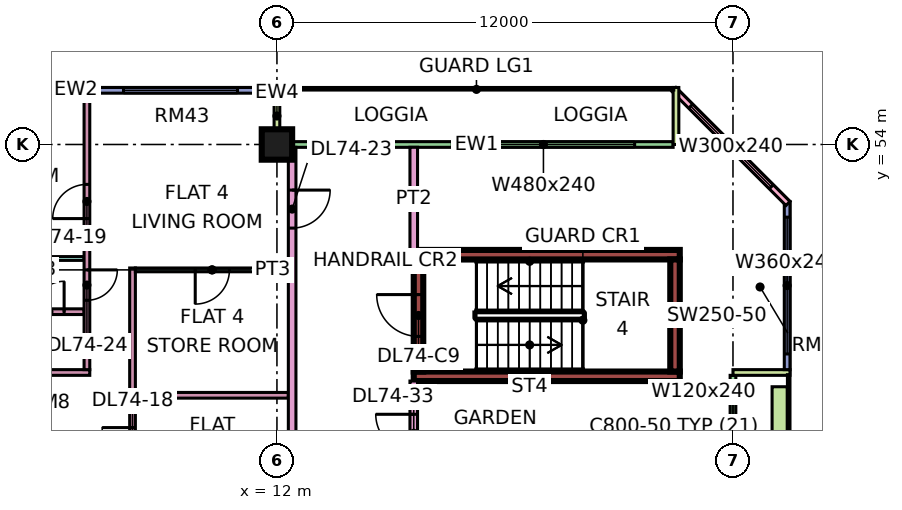
"""IFC4 building model, lengths in metres.
Left out: names, types, materials, properties, quantities, classifications, styles, units other than length and angle.
Written with IfcOpenShell. Run it as: python <this file> out.ifc"""

import sys

from ifc_helpers import new_model, si_unit, direction, frame, frame_2d, origin, origin_2d, place, context, subcontext, project, spatial, rectangle, extrude, element, fill, save


model = new_model("IFC4")
c1 = context("Model", 3, precision=1e-05, world=origin(), true_north=direction((0.0, 1.0)))
c2 = subcontext(c1, "Body", "Model", "MODEL_VIEW")
j1 = project(units=[si_unit("LENGTHUNIT", "METRE"), si_unit("PLANEANGLEUNIT", "RADIAN")], contexts=[c1])
p1 = place(None, origin())
s1 = spatial("IfcSite", under=j1, at=p1, CompositionType="ELEMENT")
p2 = place(p1, origin())
s2 = spatial("IfcBuilding", under=s1, at=p2, CompositionType="ELEMENT")
p3 = place(p2, frame((0.0, 0.0, 314.65)))
s3 = spatial("IfcBuildingStorey", under=s2, at=p3, CompositionType="ELEMENT", Elevation=314.65)
p4 = place(p3, frame((12.0, 54.0, 0.0), z_axis=(0.0, 0.0, 1.0), x_axis=(1.0, 0.0, 0.0)))
e1 = element("IfcColumn", 1, at=p4, inside=s3, PredefinedType="COLUMN", context=c2, shape_type="SweptSolid", body=[
    extrude(rectangle(XDim=0.8, YDim=0.8, at=origin_2d()), origin(), (0.0, 0.0, 1.0), 3.75),
])
for number, where, z_axis, x_axis in (
    (2, (15.6, 47.9, 0.0), (0.0, 0.0, 1.0), (1.0, 0.0, 0.0)),
    (3, (15.6, 51.1, 0.0), (0.0, 0.0, 1.0), (1.0, 0.0, 0.0)),
):
    element("IfcWall", number, at=place(p3, frame(where, z_axis=z_axis, x_axis=x_axis)), inside=s3, PredefinedType="SHEAR", context=c2, shape_type="SweptSolid", body=[
        extrude(rectangle(XDim=7.0, YDim=0.25, at=frame_2d((3.5, 0.0))), origin(), (0.0, 0.0, 1.0), 3.75),
    ])
p5 = place(p3, frame((15.725, 48.025, 0.0), z_axis=(0.0, 0.0, 1.0), x_axis=(0.0, 1.0, 0.0)))
e4 = element("IfcWall", 4, at=p5, inside=s3, PredefinedType="SHEAR", context=c2, shape_type="SweptSolid", body=[
    extrude(rectangle(XDim=2.95, YDim=0.25, at=frame_2d((1.475, 0.0))), origin(), (0.0, 0.0, 1.0), 3.75),
])
p6 = place(p5, frame((0.925, 0.0, 0.0)))
e5 = element("IfcOpeningElement", 5, at=p6, cuts=e4, PredefinedType="OPENING", context=c2, shape_type="SweptSolid", body=[
    extrude(rectangle(XDim=1.1, YDim=2.2, at=frame_2d((0.55, 1.1))), frame((0.0, 0.135, 0.0), z_axis=(0.0, -1.0, 0.0), x_axis=(1.0, 0.0, 0.0)), (0.0, 0.0, 1.0), 0.27),
])
p7 = place(p3, frame((22.475, 48.025, 0.0), z_axis=(0.0, 0.0, 1.0), x_axis=(0.0, 1.0, 0.0)))
e6 = element("IfcWall", 6, at=p7, inside=s3, PredefinedType="SHEAR", context=c2, shape_type="SweptSolid", body=[
    extrude(rectangle(XDim=2.95, YDim=0.25, at=frame_2d((1.475, 0.0))), origin(), (0.0, 0.0, 1.0), 3.75),
])
p8 = place(p3, frame((24.0, 40.575, 0.0), z_axis=(0.0, 0.0, 1.0), x_axis=(0.0, 1.0, 0.0)))
e7 = element("IfcWall", 7, at=p8, inside=s3, PredefinedType="SOLIDWALL", context=c2, shape_type="SweptSolid", body=[
    extrude(rectangle(XDim=7.35, YDim=0.15, at=frame_2d((3.675, 0.0))), origin(), (0.0, 0.0, 1.0), 3.35),
])
p9 = place(p8, frame((0.262, 0.0, 0.45)))
e8 = element("IfcOpeningElement", 8, at=p9, cuts=e7, PredefinedType="OPENING", context=c2, shape_type="SweptSolid", body=[
    extrude(rectangle(XDim=0.9, YDim=2.4, at=frame_2d((0.45, 1.2))), frame((0.0, 0.085, 0.0), z_axis=(0.0, -1.0, 0.0), x_axis=(1.0, 0.0, 0.0)), (0.0, 0.0, 1.0), 0.17),
])
p10 = place(p8, frame((2.075, 0.0, 0.0)))
e9 = element("IfcOpeningElement", 9, at=p10, cuts=e7, PredefinedType="OPENING", context=c2, shape_type="SweptSolid", body=[
    extrude(rectangle(XDim=1.2, YDim=2.4, at=frame_2d((0.6, 1.2))), frame((0.0, 0.085, 0.0), z_axis=(0.0, -1.0, 0.0), x_axis=(1.0, 0.0, 0.0)), (0.0, 0.0, 1.0), 0.17),
])
p11 = place(p8, frame((5.538, 0.0, 0.45)))
e10 = element("IfcOpeningElement", 10, at=p11, cuts=e7, PredefinedType="OPENING", context=c2, shape_type="SweptSolid", body=[
    extrude(rectangle(XDim=1.2, YDim=2.4, at=frame_2d((0.6, 1.2))), frame((0.0, 0.085, 0.0), z_axis=(0.0, -1.0, 0.0), x_axis=(1.0, 0.0, 0.0)), (0.0, 0.0, 1.0), 0.17),
])
p12 = place(p3, frame((25.5, 48.0, 0.0), z_axis=(0.0, 0.0, 1.0), x_axis=(-1.0, 0.0, 0.0)))
e11 = element("IfcWall", 11, at=p12, inside=s3, PredefinedType="SOLIDWALL", context=c2, shape_type="SweptSolid", body=[
    extrude(rectangle(XDim=1.5, YDim=0.15, at=frame_2d((0.75, 0.0))), origin(), (0.0, 0.0, 1.0), 3.35),
])
p13 = place(p3, frame((25.425, 48.075, 0.0), z_axis=(0.0, 0.0, 1.0), x_axis=(0.0, 1.0, 0.0)))
e12 = element("IfcWall", 12, at=p13, inside=s3, PredefinedType="SOLIDWALL", context=c2, shape_type="SweptSolid", body=[
    extrude(rectangle(XDim=4.425, YDim=0.15, at=frame_2d((2.212, 0.0))), origin(), (0.0, 0.0, 1.0), 3.35),
])
p14 = place(p13, frame((0.413, 0.0, 0.45)))
e13 = element("IfcOpeningElement", 13, at=p14, cuts=e12, PredefinedType="OPENING", context=c2, shape_type="SweptSolid", body=[
    extrude(rectangle(XDim=3.6, YDim=2.4, at=frame_2d((1.8, 1.2))), frame((0.0, 0.085, 0.0), z_axis=(0.0, -1.0, 0.0), x_axis=(1.0, 0.0, 0.0)), (0.0, 0.0, 1.0), 0.17),
])
p15 = place(p3, frame((25.447, 52.447, 0.0), z_axis=(0.0, 0.0, 1.0), x_axis=(-0.707106781187, 0.707106781187, 0.0)))
e14 = element("IfcWall", 14, at=p15, inside=s3, PredefinedType="SOLIDWALL", context=c2, shape_type="SweptSolid", body=[
    extrude(rectangle(XDim=4.243, YDim=0.15, at=frame_2d((2.121, 0.0))), origin(), (0.0, 0.0, 1.0), 3.35),
])
p16 = place(p15, frame((0.621, 0.0, 0.45)))
e15 = element("IfcOpeningElement", 15, at=p16, cuts=e14, PredefinedType="OPENING", context=c2, shape_type="SweptSolid", body=[
    extrude(rectangle(XDim=3.0, YDim=2.4, at=frame_2d((1.5, 1.2))), frame((0.0, 0.085, 0.0), z_axis=(0.0, -1.0, 0.0), x_axis=(1.0, 0.0, 0.0)), (0.0, 0.0, 1.0), 0.17),
])
p17 = place(p3, frame((22.425, 54.0, 0.0), z_axis=(0.0, 0.0, 1.0), x_axis=(-1.0, 0.0, 0.0)))
e16 = element("IfcWall", 16, at=p17, inside=s3, PredefinedType="SOLIDWALL", context=c2, shape_type="SweptSolid", body=[
    extrude(rectangle(XDim=10.35, YDim=0.15, at=frame_2d((5.175, 0.0))), origin(), (0.0, 0.0, 1.0), 3.35),
])
p18 = place(p17, frame((1.012, 0.0, 0.45)))
e17 = element("IfcOpeningElement", 17, at=p18, cuts=e16, PredefinedType="OPENING", context=c2, shape_type="SweptSolid", body=[
    extrude(rectangle(XDim=4.8, YDim=2.4, at=frame_2d((2.4, 1.2))), frame((0.0, 0.085, 0.0), z_axis=(0.0, -1.0, 0.0), x_axis=(1.0, 0.0, 0.0)), (0.0, 0.0, 1.0), 0.17),
])
for number, where, z_axis, x_axis in (
    (18, (22.5, 55.5, 0.0), (0.0, 0.0, 1.0), (0.0, -1.0, 0.0)),
    (19, (12.0, 55.5, 0.0), (0.0, 0.0, 1.0), (0.0, -1.0, 0.0)),
):
    element("IfcWall", number, at=place(p3, frame(where, z_axis=z_axis, x_axis=x_axis)), inside=s3, PredefinedType="SOLIDWALL", context=c2, shape_type="SweptSolid", body=[
        extrude(rectangle(XDim=1.5, YDim=0.15, at=frame_2d((0.75, 0.0))), origin(), (0.0, 0.0, 1.0), 3.35),
    ])
p19 = place(p3, frame((11.925, 55.425, 0.0), z_axis=(0.0, 0.0, 1.0), x_axis=(-1.0, 0.0, 0.0)))
e20 = element("IfcWall", 20, at=p19, inside=s3, PredefinedType="SOLIDWALL", context=c2, shape_type="SweptSolid", body=[
    extrude(rectangle(XDim=10.425, YDim=0.15, at=frame_2d((5.212, 0.0))), origin(), (0.0, 0.0, 1.0), 3.35),
])
p20 = place(p19, frame((0.962, 0.0, 0.45)))
e21 = element("IfcOpeningElement", 21, at=p20, cuts=e20, PredefinedType="OPENING", context=c2, shape_type="SweptSolid", body=[
    extrude(rectangle(XDim=3.0, YDim=2.4, at=frame_2d((1.5, 1.2))), frame((0.0, 0.085, 0.0), z_axis=(0.0, -1.0, 0.0), x_axis=(1.0, 0.0, 0.0)), (0.0, 0.0, 1.0), 0.17),
])
p21 = place(p19, frame((6.175, 0.0, 0.45)))
e22 = element("IfcOpeningElement", 22, at=p21, cuts=e20, PredefinedType="OPENING", context=c2, shape_type="SweptSolid", body=[
    extrude(rectangle(XDim=3.0, YDim=2.4, at=frame_2d((1.5, 1.2))), frame((0.0, 0.085, 0.0), z_axis=(0.0, -1.0, 0.0), x_axis=(1.0, 0.0, 0.0)), (0.0, 0.0, 1.0), 0.17),
])
p22 = place(p3, frame((25.229, 40.875, 0.0), z_axis=(0.0, 0.0, 1.0), x_axis=(0.0, 1.0, 0.0)))
e23 = element("IfcWall", 23, at=p22, inside=s3, PredefinedType="SOLIDWALL", context=c2, shape_type="SweptSolid", body=[
    extrude(rectangle(XDim=6.75, YDim=0.4, at=frame_2d((3.375, 0.0))), origin(), (0.0, 0.0, 1.0), 0.7),
])
p23 = place(p3, frame((-1.351, 51.0, 0.0), z_axis=(0.0, 0.0, 1.0), x_axis=(1.0, 0.0, 0.0)))
e24 = element("IfcWall", 24, at=p23, inside=s3, PredefinedType="PARTITIONING", context=c2, shape_type="SweptSolid", body=[
    extrude(rectangle(XDim=8.276, YDim=0.1, at=frame_2d((4.138, 0.0))), origin(), (0.0, 0.0, 1.0), 3.35),
])
p24 = place(p3, frame((0.0, 48.0, 0.0), z_axis=(0.0, 0.0, 1.0), x_axis=(1.0, 0.0, 0.0)))
e25 = element("IfcWall", 25, at=p24, inside=s3, PredefinedType="PARTITIONING", context=c2, shape_type="SweptSolid", body=[
    extrude(rectangle(XDim=7.075, YDim=0.15, at=frame_2d((3.538, 0.0))), origin(), (0.0, 0.0, 1.0), 3.35),
])
p25 = place(p3, frame((4.925, 49.6, 0.0), z_axis=(0.0, 0.0, 1.0), x_axis=(1.0, 0.0, 0.0)))
e26 = element("IfcWall", 26, at=p25, inside=s3, PredefinedType="PARTITIONING", context=c2, shape_type="SweptSolid", body=[
    extrude(rectangle(XDim=2.0, YDim=0.15, at=frame_2d((1.0, 0.0))), origin(), (0.0, 0.0, 1.0), 3.35),
])
p26 = place(p25, frame((0.675, 0.0, 0.0)))
e27 = element("IfcOpeningElement", 27, at=p26, cuts=e26, PredefinedType="OPENING", context=c2, shape_type="SweptSolid", body=[
    extrude(rectangle(XDim=0.8, YDim=2.1, at=frame_2d((0.4, 1.05))), frame((0.0, 0.085, 0.0), z_axis=(0.0, -1.0, 0.0), x_axis=(1.0, 0.0, 0.0)), (0.0, 0.0, 1.0), 0.17),
])
p27 = place(p3, frame((7.0, 48.075, 0.0), z_axis=(0.0, 0.0, 1.0), x_axis=(0.0, 1.0, 0.0)))
e28 = element("IfcWall", 28, at=p27, inside=s3, PredefinedType="PARTITIONING", context=c2, shape_type="SweptSolid", body=[
    extrude(rectangle(XDim=7.275, YDim=0.15, at=frame_2d((3.638, 0.0))), origin(), (0.0, 0.0, 1.0), 3.35),
])
p28 = place(p27, frame((3.975, 0.0, 0.0)))
e29 = element("IfcOpeningElement", 29, at=p28, cuts=e28, PredefinedType="OPENING", context=c2, shape_type="SweptSolid", body=[
    extrude(rectangle(XDim=0.9, YDim=2.1, at=frame_2d((0.45, 1.05))), frame((0.0, 0.085, 0.0), z_axis=(0.0, -1.0, 0.0), x_axis=(1.0, 0.0, 0.0)), (0.0, 0.0, 1.0), 0.17),
])
p29 = place(p27, frame((1.825, 0.0, 0.0)))
e30 = element("IfcOpeningElement", 30, at=p29, cuts=e28, PredefinedType="OPENING", context=c2, shape_type="SweptSolid", body=[
    extrude(rectangle(XDim=0.8, YDim=2.1, at=frame_2d((0.4, 1.05))), frame((0.0, 0.085, 0.0), z_axis=(0.0, -1.0, 0.0), x_axis=(1.0, 0.0, 0.0)), (0.0, 0.0, 1.0), 0.17),
])
p30 = place(p3, frame((8.2, 36.1, 0.0), z_axis=(0.0, 0.0, 1.0), x_axis=(0.0, 1.0, 0.0)))
e31 = element("IfcWall", 31, at=p30, inside=s3, PredefinedType="PARTITIONING", context=c2, shape_type="SweptSolid", body=[
    extrude(rectangle(XDim=14.65, YDim=0.15, at=frame_2d((7.325, 0.0))), origin(), (0.0, 0.0, 1.0), 3.35),
])
p31 = place(p30, frame((9.65, 0.0, 0.0)))
e32 = element("IfcOpeningElement", 32, at=p31, cuts=e31, PredefinedType="OPENING", context=c2, shape_type="SweptSolid", body=[
    extrude(rectangle(XDim=0.8, YDim=2.1, at=frame_2d((0.4, 1.05))), frame((0.0, 0.085, 0.0), z_axis=(0.0, -1.0, 0.0), x_axis=(1.0, 0.0, 0.0)), (0.0, 0.0, 1.0), 0.17),
])
p32 = place(p30, frame((5.15, 0.0, 0.0)))
e33 = element("IfcOpeningElement", 33, at=p32, cuts=e31, PredefinedType="OPENING", context=c2, shape_type="SweptSolid", body=[
    extrude(rectangle(XDim=0.9, YDim=2.1, at=frame_2d((0.45, 1.05))), frame((0.0, 0.085, 0.0), z_axis=(0.0, -1.0, 0.0), x_axis=(1.0, 0.0, 0.0)), (0.0, 0.0, 1.0), 0.17),
])
p33 = place(p30, frame((0.65, 0.0, 0.0)))
e34 = element("IfcOpeningElement", 34, at=p33, cuts=e31, PredefinedType="OPENING", context=c2, shape_type="SweptSolid", body=[
    extrude(rectangle(XDim=0.9, YDim=2.1, at=frame_2d((0.45, 1.05))), frame((0.0, 0.085, 0.0), z_axis=(0.0, -1.0, 0.0), x_axis=(1.0, 0.0, 0.0)), (0.0, 0.0, 1.0), 0.17),
])
p34 = place(p3, frame((8.275, 47.4, 0.0), z_axis=(0.0, 0.0, 1.0), x_axis=(1.0, 0.0, 0.0)))
e35 = element("IfcWall", 35, at=p34, inside=s3, PredefinedType="PARTITIONING", context=c2, shape_type="SweptSolid", body=[
    extrude(rectangle(XDim=4.025, YDim=0.15, at=frame_2d((2.013, 0.0))), origin(), (0.0, 0.0, 1.0), 3.35),
])
p35 = place(p3, frame((8.275, 50.7, 0.0), z_axis=(0.0, 0.0, 1.0), x_axis=(1.0, 0.0, 0.0)))
e36 = element("IfcWall", 36, at=p35, inside=s3, PredefinedType="PARTITIONING", context=c2, shape_type="SweptSolid", body=[
    extrude(rectangle(XDim=4.025, YDim=0.1, at=frame_2d((2.013, 0.0))), origin(), (0.0, 0.0, 1.0), 3.35),
])
p36 = place(p35, frame((1.575, 0.0, 0.0)))
e37 = element("IfcOpeningElement", 37, at=p36, cuts=e36, PredefinedType="OPENING", context=c2, shape_type="SweptSolid", body=[
    extrude(rectangle(XDim=0.9, YDim=2.1, at=frame_2d((0.45, 1.05))), frame((0.0, 0.06, 0.0), z_axis=(0.0, -1.0, 0.0), x_axis=(1.0, 0.0, 0.0)), (0.0, 0.0, 1.0), 0.12),
])
p37 = place(p3, frame((12.4, 20.0, 0.0), z_axis=(0.0, 0.0, 1.0), x_axis=(0.0, 1.0, 0.0)))
e38 = element("IfcWall", 38, at=p37, inside=s3, PredefinedType="PARTITIONING", context=c2, shape_type="SweptSolid", body=[
    extrude(rectangle(XDim=33.926, YDim=0.2, at=frame_2d((16.963, 0.0))), origin(), (0.0, 0.0, 1.0), 3.35),
])
p38 = place(p37, frame((31.8, 0.0, 0.0)))
e39 = element("IfcOpeningElement", 39, at=p38, cuts=e38, PredefinedType="OPENING", context=c2, shape_type="SweptSolid", body=[
    extrude(rectangle(XDim=1.0, YDim=2.1, at=frame_2d((0.5, 1.05))), frame((0.0, 0.11, 0.0), z_axis=(0.0, -1.0, 0.0), x_axis=(1.0, 0.0, 0.0)), (0.0, 0.0, 1.0), 0.22),
])
p39 = place(p37, frame((0.6, 0.0, 0.0)))
e40 = element("IfcOpeningElement", 40, at=p39, cuts=e38, PredefinedType="OPENING", context=c2, shape_type="SweptSolid", body=[
    extrude(rectangle(XDim=1.2, YDim=2.1, at=frame_2d((0.6, 1.05))), frame((0.0, 0.11, 0.0), z_axis=(0.0, -1.0, 0.0), x_axis=(1.0, 0.0, 0.0)), (0.0, 0.0, 1.0), 0.22),
])
p40 = place(p37, frame((4.5, 0.0, 0.0)))
e41 = element("IfcOpeningElement", 41, at=p40, cuts=e38, PredefinedType="OPENING", context=c2, shape_type="SweptSolid", body=[
    extrude(rectangle(XDim=1.0, YDim=2.1, at=frame_2d((0.5, 1.05))), frame((0.0, 0.11, 0.0), z_axis=(0.0, -1.0, 0.0), x_axis=(1.0, 0.0, 0.0)), (0.0, 0.0, 1.0), 0.22),
])
p41 = place(p3, frame((15.6, 20.0, 0.0), z_axis=(0.0, 0.0, 1.0), x_axis=(0.0, 1.0, 0.0)))
e42 = element("IfcWall", 42, at=p41, inside=s3, PredefinedType="PARTITIONING", context=c2, shape_type="SweptSolid", body=[
    extrude(rectangle(XDim=27.775, YDim=0.2, at=frame_2d((13.887, 0.0))), origin(), (0.0, 0.0, 1.0), 3.35),
])
p42 = place(p41, frame((6.7, 0.0, 0.0)))
e43 = element("IfcOpeningElement", 43, at=p42, cuts=e42, PredefinedType="OPENING", context=c2, shape_type="SweptSolid", body=[
    extrude(rectangle(XDim=1.6, YDim=2.1, at=frame_2d((0.8, 1.05))), frame((0.0, 0.11, 0.0), z_axis=(0.0, -1.0, 0.0), x_axis=(1.0, 0.0, 0.0)), (0.0, 0.0, 1.0), 0.22),
])
p43 = place(p41, frame((12.95, 0.0, 0.0)))
e44 = element("IfcOpeningElement", 44, at=p43, cuts=e42, PredefinedType="OPENING", context=c2, shape_type="SweptSolid", body=[
    extrude(rectangle(XDim=1.0, YDim=2.1, at=frame_2d((0.5, 1.05))), frame((0.0, 0.11, 0.0), z_axis=(0.0, -1.0, 0.0), x_axis=(1.0, 0.0, 0.0)), (0.0, 0.0, 1.0), 0.22),
])
p44 = place(p41, frame((16.75, 0.0, 0.0)))
e45 = element("IfcOpeningElement", 45, at=p44, cuts=e42, PredefinedType="OPENING", context=c2, shape_type="SweptSolid", body=[
    extrude(rectangle(XDim=1.0, YDim=2.1, at=frame_2d((0.5, 1.05))), frame((0.0, 0.11, 0.0), z_axis=(0.0, -1.0, 0.0), x_axis=(1.0, 0.0, 0.0)), (0.0, 0.0, 1.0), 0.22),
])
p45 = place(p41, frame((1.15, 0.0, 0.0)))
e46 = element("IfcOpeningElement", 46, at=p45, cuts=e42, PredefinedType="OPENING", context=c2, shape_type="SweptSolid", body=[
    extrude(rectangle(XDim=1.8, YDim=2.1, at=frame_2d((0.9, 1.05))), frame((0.0, 0.11, 0.0), z_axis=(0.0, -1.0, 0.0), x_axis=(1.0, 0.0, 0.0)), (0.0, 0.0, 1.0), 0.22),
])
p46 = place(p41, frame((25.9, 0.0, 0.0)))
e47 = element("IfcOpeningElement", 47, at=p46, cuts=e42, PredefinedType="OPENING", context=c2, shape_type="SweptSolid", body=[
    extrude(rectangle(XDim=1.0, YDim=2.1, at=frame_2d((0.5, 1.05))), frame((0.0, 0.11, 0.0), z_axis=(0.0, -1.0, 0.0), x_axis=(1.0, 0.0, 0.0)), (0.0, 0.0, 1.0), 0.22),
])
p47 = place(p3, frame((15.6, 51.225, 0.0), z_axis=(0.0, 0.0, 1.0), x_axis=(0.0, 1.0, 0.0)))
e48 = element("IfcWall", 48, at=p47, inside=s3, PredefinedType="PARTITIONING", context=c2, shape_type="SweptSolid", body=[
    extrude(rectangle(XDim=2.701, YDim=0.2, at=frame_2d((1.351, 0.0))), origin(), (0.0, 0.0, 1.0), 3.35),
])
p48 = place(p11, origin())
e49 = element("IfcWindow", 49, at=p48, inside=s3, PartitioningType="SINGLE_PANEL", PredefinedType="WINDOW", context=c2, shape_type="SweptSolid", body=[
    extrude(rectangle(XDim=1.2, YDim=2.4, at=frame_2d((0.6, 1.2))), frame((0.0, 0.03, 0.0), z_axis=(0.0, -1.0, 0.0), x_axis=(1.0, 0.0, 0.0)), (0.0, 0.0, 1.0), 0.06),
])
fill(e10, e49)
p49 = place(p14, origin())
e50 = element("IfcWindow", 50, at=p49, inside=s3, PartitioningType="SINGLE_PANEL", PredefinedType="WINDOW", context=c2, shape_type="SweptSolid", body=[
    extrude(rectangle(XDim=3.6, YDim=2.4, at=frame_2d((1.8, 1.2))), frame((0.0, 0.03, 0.0), z_axis=(0.0, -1.0, 0.0), x_axis=(1.0, 0.0, 0.0)), (0.0, 0.0, 1.0), 0.06),
])
fill(e13, e50)
p50 = place(p16, origin())
e51 = element("IfcWindow", 51, at=p50, inside=s3, PartitioningType="SINGLE_PANEL", PredefinedType="WINDOW", context=c2, shape_type="SweptSolid", body=[
    extrude(rectangle(XDim=3.0, YDim=2.4, at=frame_2d((1.5, 1.2))), frame((0.0, 0.03, 0.0), z_axis=(0.0, -1.0, 0.0), x_axis=(1.0, 0.0, 0.0)), (0.0, 0.0, 1.0), 0.06),
])
fill(e15, e51)
p51 = place(p18, origin())
e52 = element("IfcWindow", 52, at=p51, inside=s3, PartitioningType="SINGLE_PANEL", PredefinedType="WINDOW", context=c2, shape_type="SweptSolid", body=[
    extrude(rectangle(XDim=4.8, YDim=2.4, at=frame_2d((2.4, 1.2))), frame((0.0, 0.03, 0.0), z_axis=(0.0, -1.0, 0.0), x_axis=(1.0, 0.0, 0.0)), (0.0, 0.0, 1.0), 0.06),
])
fill(e17, e52)
p52 = place(p20, origin())
e53 = element("IfcWindow", 53, at=p52, inside=s3, PartitioningType="SINGLE_PANEL", PredefinedType="WINDOW", context=c2, shape_type="SweptSolid", body=[
    extrude(rectangle(XDim=3.0, YDim=2.4, at=frame_2d((1.5, 1.2))), frame((0.0, 0.03, 0.0), z_axis=(0.0, -1.0, 0.0), x_axis=(1.0, 0.0, 0.0)), (0.0, 0.0, 1.0), 0.06),
])
fill(e21, e53)
p53 = place(p6, frame((1.1, 0.0, 0.0), z_axis=(0.0, 0.0, 1.0), x_axis=(-1.0, 0.0, 0.0)))
e54 = element("IfcDoor", 54, at=p53, inside=s3, OperationType="SINGLE_SWING_RIGHT", PredefinedType="DOOR", context=c2, shape_type="SweptSolid", body=[
    extrude(rectangle(XDim=1.1, YDim=2.2, at=frame_2d((0.55, 1.1))), frame((0.0, 0.025, 0.0), z_axis=(0.0, -1.0, 0.0), x_axis=(1.0, 0.0, 0.0)), (0.0, 0.0, 1.0), 0.05),
])
fill(e5, e54)
p54 = place(p31, frame((0.8, 0.0, 0.0), z_axis=(0.0, 0.0, 1.0), x_axis=(-1.0, 0.0, 0.0)))
e55 = element("IfcDoor", 55, at=p54, inside=s3, OperationType="SINGLE_SWING_RIGHT", PredefinedType="DOOR", context=c2, shape_type="SweptSolid", body=[
    extrude(rectangle(XDim=0.8, YDim=2.1, at=frame_2d((0.4, 1.05))), frame((0.0, 0.025, 0.0), z_axis=(0.0, -1.0, 0.0), x_axis=(1.0, 0.0, 0.0)), (0.0, 0.0, 1.0), 0.05),
])
fill(e32, e55)
p55 = place(p28, origin())
e56 = element("IfcDoor", 56, at=p55, inside=s3, OperationType="SINGLE_SWING_LEFT", PredefinedType="DOOR", context=c2, shape_type="SweptSolid", body=[
    extrude(rectangle(XDim=0.9, YDim=2.1, at=frame_2d((0.45, 1.05))), frame((0.0, 0.025, 0.0), z_axis=(0.0, -1.0, 0.0), x_axis=(1.0, 0.0, 0.0)), (0.0, 0.0, 1.0), 0.05),
])
fill(e29, e56)
p56 = place(p38, origin())
e57 = element("IfcDoor", 57, at=p56, inside=s3, OperationType="SINGLE_SWING_RIGHT", PredefinedType="DOOR", context=c2, shape_type="SweptSolid", body=[
    extrude(rectangle(XDim=1.0, YDim=2.1, at=frame_2d((0.5, 1.05))), frame((0.0, 0.025, 0.0), z_axis=(0.0, -1.0, 0.0), x_axis=(1.0, 0.0, 0.0)), (0.0, 0.0, 1.0), 0.05),
])
fill(e39, e57)
p57 = place(p29, origin())
e58 = element("IfcDoor", 58, at=p57, inside=s3, OperationType="SINGLE_SWING_RIGHT", PredefinedType="DOOR", context=c2, shape_type="SweptSolid", body=[
    extrude(rectangle(XDim=0.8, YDim=2.1, at=frame_2d((0.4, 1.05))), frame((0.0, 0.025, 0.0), z_axis=(0.0, -1.0, 0.0), x_axis=(1.0, 0.0, 0.0)), (0.0, 0.0, 1.0), 0.05),
])
fill(e30, e58)
p58 = place(p26, frame((0.8, 0.0, 0.0), z_axis=(0.0, 0.0, 1.0), x_axis=(-1.0, 0.0, 0.0)))
e59 = element("IfcDoor", 59, at=p58, inside=s3, OperationType="SINGLE_SWING_RIGHT", PredefinedType="DOOR", context=c2, shape_type="SweptSolid", body=[
    extrude(rectangle(XDim=0.8, YDim=2.1, at=frame_2d((0.4, 1.05))), frame((0.0, 0.025, 0.0), z_axis=(0.0, -1.0, 0.0), x_axis=(1.0, 0.0, 0.0)), (0.0, 0.0, 1.0), 0.05),
])
fill(e27, e59)
p59 = place(p36, frame((0.9, 0.0, 0.0), z_axis=(0.0, 0.0, 1.0), x_axis=(-1.0, 0.0, 0.0)))
e60 = element("IfcDoor", 60, at=p59, inside=s3, OperationType="SINGLE_SWING_LEFT", PredefinedType="DOOR", context=c2, shape_type="SweptSolid", body=[
    extrude(rectangle(XDim=0.9, YDim=2.1, at=frame_2d((0.45, 1.05))), frame((0.0, 0.025, 0.0), z_axis=(0.0, -1.0, 0.0), x_axis=(1.0, 0.0, 0.0)), (0.0, 0.0, 1.0), 0.05),
])
fill(e37, e60)
p60 = place(p46, frame((1.0, 0.0, 0.0), z_axis=(0.0, 0.0, 1.0), x_axis=(-1.0, 0.0, 0.0)))
e61 = element("IfcDoor", 61, at=p60, inside=s3, OperationType="SINGLE_SWING_RIGHT", PredefinedType="DOOR", context=c2, shape_type="SweptSolid", body=[
    extrude(rectangle(XDim=1.0, YDim=2.1, at=frame_2d((0.5, 1.05))), frame((0.0, 0.025, 0.0), z_axis=(0.0, -1.0, 0.0), x_axis=(1.0, 0.0, 0.0)), (0.0, 0.0, 1.0), 0.05),
])
fill(e47, e61)
save(model, sys.argv[1])
